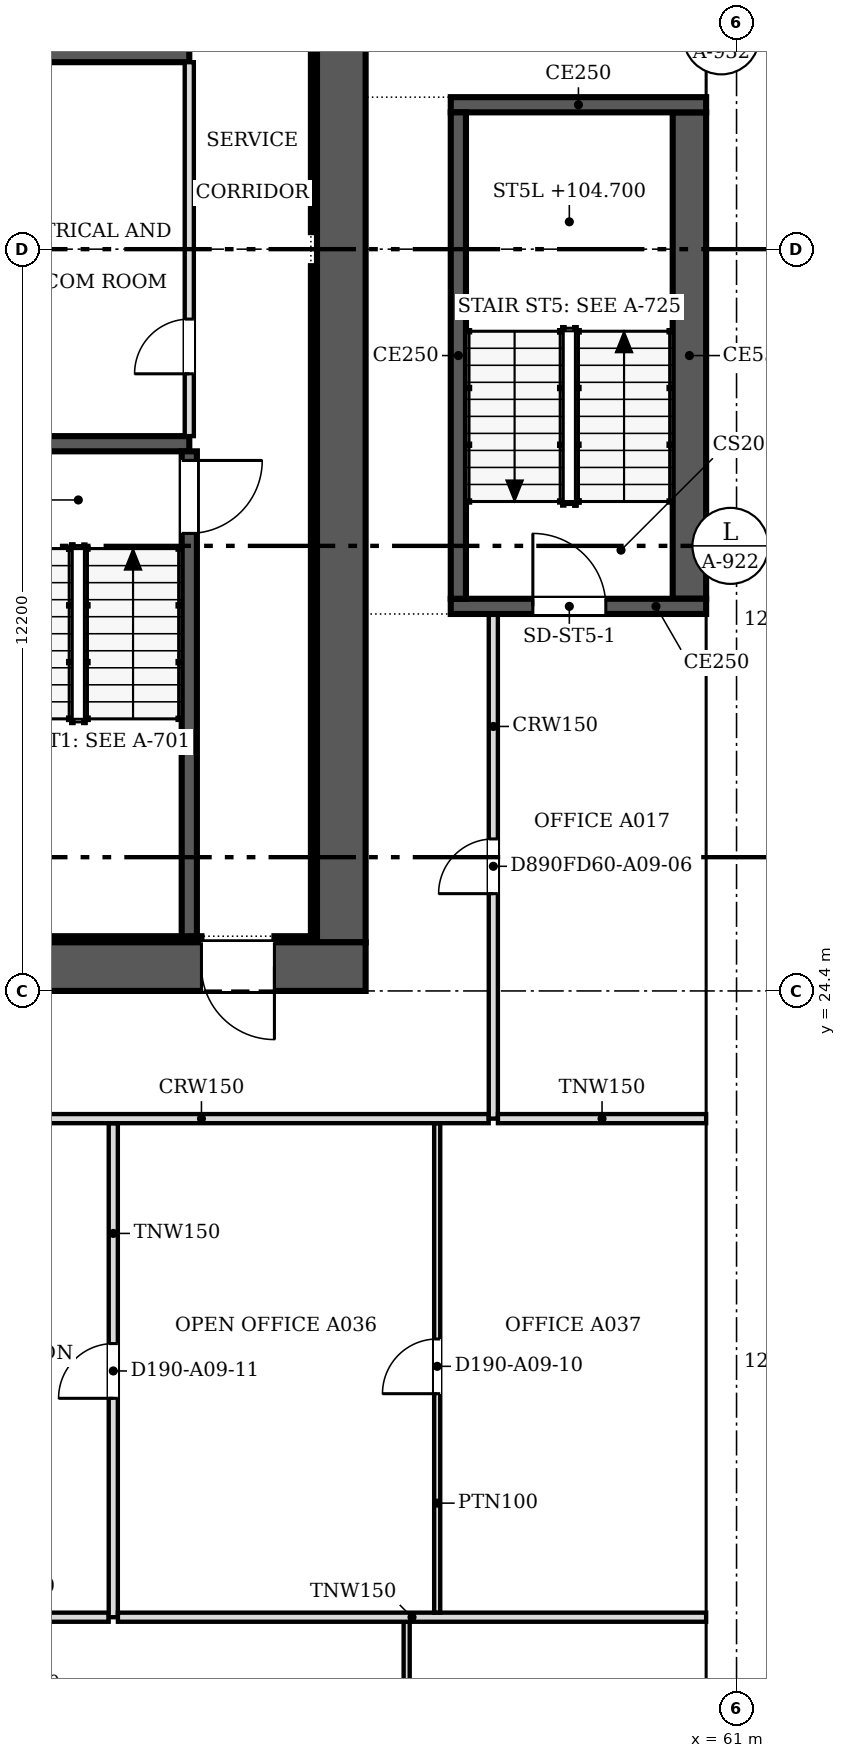
"""IFC4 building model, lengths in metres.
Left out: names, types, materials, properties, quantities, classifications, styles, units other than length and angle.
Written with IfcOpenShell. Run it as: python <this file> out.ifc"""

import sys

from ifc_helpers import new_model, si_unit, direction, frame, frame_2d, origin, place, context, subcontext, project, spatial, polyline, rectangle, outline, extrude, faceted_brep, source, transform, mapped, element, fill, save


model = new_model("IFC4")
c1 = context("Model", 3, precision=1e-05, world=origin(), true_north=direction((0.0, 1.0)))
c2 = subcontext(c1, "Body", "Model", "MODEL_VIEW")
j1 = project(units=[si_unit("LENGTHUNIT", "METRE"), si_unit("PLANEANGLEUNIT", "RADIAN")], contexts=[c1])
p1 = place(None, origin())
s1 = spatial("IfcSite", under=j1, at=p1, CompositionType="ELEMENT")
p2 = place(p1, origin())
s2 = spatial("IfcBuilding", under=s1, at=p2, CompositionType="ELEMENT")
p3 = place(p2, frame((0.0, 0.0, 102.8)))
s3 = spatial("IfcBuildingStorey", under=s2, at=p3, CompositionType="ELEMENT", Elevation=102.8)
m1 = source(origin(), c2, "Body", "SweptSolid", [
    extrude(outline(polyline([(3.05, 0.0), (6.1, 3.8), (3.05, 7.6), (0.0, 3.8), (3.05, 0.0)])), frame((0.0, 0.25, 0.0), z_axis=(0.0, -1.0, 0.0), x_axis=(1.0, 0.0, 0.0)), (0.0, 0.0, 1.0), 0.5),
])
p4 = place(p3, frame((60.75, 9.15, -3.8), z_axis=(0.0, 0.0, 1.0), x_axis=(0.0, 1.0, 0.0)))
e1 = element("IfcWall", 1, at=p4, inside=s3, PredefinedType="SOLIDWALL", context=c2, shape_type="MappedRepresentation", body=[
    mapped(m1, transform((0.0, 0.0, 0.0), scale=1.0)),
])
m2 = source(origin(), c2, "Body", "SweptSolid", [
    extrude(outline(polyline([(3.05, 0.399), (5.78, 3.8), (3.05, 7.201), (0.321, 3.8), (3.05, 0.399)])), frame((0.0, 0.26, 0.0), z_axis=(0.0, -1.0, 0.0), x_axis=(1.0, 0.0, 0.0)), (0.0, 0.0, 1.0), 0.52),
])
p5 = place(p4, origin())
e2 = element("IfcOpeningElement", 2, at=p5, cuts=e1, PredefinedType="OPENING", context=c2, shape_type="MappedRepresentation", body=[
    mapped(m2, transform((0.0, 0.0, 0.0), scale=1.0)),
])
p6 = place(p3, frame((60.75, 15.25, -3.8), z_axis=(0.0, 0.0, 1.0), x_axis=(0.0, 1.0, 0.0)))
e3 = element("IfcWall", 3, at=p6, inside=s3, PredefinedType="SOLIDWALL", context=c2, shape_type="MappedRepresentation", body=[
    mapped(m1, transform((0.0, 0.0, 0.0), scale=1.0)),
])
p7 = place(p6, origin())
e4 = element("IfcOpeningElement", 4, at=p7, cuts=e3, PredefinedType="OPENING", context=c2, shape_type="MappedRepresentation", body=[
    mapped(m2, transform((0.0, 0.0, 0.0), scale=1.0)),
])
m3 = source(origin(), c2, "Body", "Brep", [
    faceted_brep([(3.05, -0.25, 0.0), (6.1, -0.25, 3.8), (6.1, -0.25, 3.8), (3.05, -0.25, 7.6), (0.0, -0.25, 3.8), (0.0, 0.25, 3.8), (3.05, 0.25, 7.6), (6.1, 0.25, 3.8), (6.1, 0.25, 3.8), (3.05, 0.25, 0.0)], [[[0, 1, 2, 3, 4]], [[5, 6, 7, 8, 9]], [[9, 8, 1, 0]], [[7, 6, 3, 2]], [[6, 5, 4, 3]], [[5, 9, 0, 4]], [[1, 8, 7, 2]]]),
])
p8 = place(p3, frame((60.75, 21.35, -3.8), z_axis=(0.0, 0.0, 1.0), x_axis=(0.0, 1.0, 0.0)))
e5 = element("IfcWall", 5, at=p8, inside=s3, PredefinedType="SOLIDWALL", context=c2, shape_type="MappedRepresentation", body=[
    mapped(m3, transform((0.0, 0.0, 0.0), scale=1.0)),
])
p9 = place(p8, origin())
e6 = element("IfcOpeningElement", 6, at=p9, cuts=e5, PredefinedType="OPENING", context=c2, shape_type="MappedRepresentation", body=[
    mapped(m2, transform((0.0, 0.0, 0.0), scale=1.0)),
])
p10 = place(p3, frame((60.75, 27.45, -3.8), z_axis=(0.0, 0.0, 1.0), x_axis=(0.0, 1.0, 0.0)))
e7 = element("IfcWall", 7, at=p10, inside=s3, PredefinedType="SOLIDWALL", context=c2, shape_type="MappedRepresentation", body=[
    mapped(m1, transform((0.0, 0.0, 0.0), scale=1.0)),
])
p11 = place(p10, origin())
e8 = element("IfcOpeningElement", 8, at=p11, cuts=e7, PredefinedType="OPENING", context=c2, shape_type="MappedRepresentation", body=[
    mapped(m2, transform((0.0, 0.0, 0.0), scale=1.0)),
])
p12 = place(p3, frame((60.75, 33.55, -3.8), z_axis=(0.0, 0.0, 1.0), x_axis=(0.0, 1.0, 0.0)))
e9 = element("IfcWall", 9, at=p12, inside=s3, PredefinedType="SOLIDWALL", context=c2, shape_type="MappedRepresentation", body=[
    mapped(m3, transform((0.0, 0.0, 0.0), scale=1.0)),
])
p13 = place(p12, origin())
e10 = element("IfcOpeningElement", 10, at=p13, cuts=e9, PredefinedType="OPENING", context=c2, shape_type="MappedRepresentation", body=[
    mapped(m2, transform((0.0, 0.0, 0.0), scale=1.0)),
])
p14 = place(p3, frame((60.75, 39.65, -3.8), z_axis=(0.0, 0.0, 1.0), x_axis=(0.0, 1.0, 0.0)))
e11 = element("IfcWall", 11, at=p14, inside=s3, PredefinedType="SOLIDWALL", context=c2, shape_type="MappedRepresentation", body=[
    mapped(m1, transform((0.0, 0.0, 0.0), scale=1.0)),
])
p15 = place(p14, origin())
e12 = element("IfcOpeningElement", 12, at=p15, cuts=e11, PredefinedType="OPENING", context=c2, shape_type="MappedRepresentation", body=[
    mapped(m2, transform((0.0, 0.0, 0.0), scale=1.0)),
])
m4 = source(origin(), c2, "Body", "SweptSolid", [
    extrude(outline(polyline([(3.05, 0.0), (6.1, 3.8), (0.0, 3.8), (3.05, 0.0)])), frame((0.0, 0.25, 0.0), z_axis=(0.0, -1.0, 0.0), x_axis=(1.0, 0.0, 0.0)), (0.0, 0.0, 1.0), 0.5),
])
p16 = place(p3, frame((60.75, 12.2, 0.0), z_axis=(0.0, 0.0, 1.0), x_axis=(0.0, 1.0, 0.0)))
e13 = element("IfcWall", 13, at=p16, inside=s3, PredefinedType="SOLIDWALL", context=c2, shape_type="MappedRepresentation", body=[
    mapped(m4, transform((0.0, 0.0, 0.0), scale=1.0)),
])
m5 = source(origin(), c2, "Body", "SweptSolid", [
    extrude(outline(polyline([(3.05, 0.399), (5.579, 3.55), (0.521, 3.55), (3.05, 0.399)])), frame((0.0, 0.26, 0.0), z_axis=(0.0, -1.0, 0.0), x_axis=(1.0, 0.0, 0.0)), (0.0, 0.0, 1.0), 0.52),
])
p17 = place(p16, origin())
e14 = element("IfcOpeningElement", 14, at=p17, cuts=e13, PredefinedType="OPENING", context=c2, shape_type="MappedRepresentation", body=[
    mapped(m5, transform((0.0, 0.0, 0.0), scale=1.0)),
])
m6 = source(origin(), c2, "Body", "Brep", [
    faceted_brep([(3.05, -0.25, 0.0), (6.1, -0.25, 3.8), (6.1, -0.25, 3.8), (0.0, -0.25, 3.8), (0.0, 0.25, 3.8), (6.1, 0.25, 3.8), (6.1, 0.25, 3.8), (3.05, 0.25, 0.0)], [[[0, 1, 2, 3]], [[4, 5, 6, 7]], [[7, 6, 1, 0]], [[5, 4, 3, 2]], [[4, 7, 0, 3]], [[1, 6, 5, 2]]]),
])
p18 = place(p3, frame((60.75, 18.3, 0.0), z_axis=(0.0, 0.0, 1.0), x_axis=(0.0, 1.0, 0.0)))
e15 = element("IfcWall", 15, at=p18, inside=s3, PredefinedType="SOLIDWALL", context=c2, shape_type="MappedRepresentation", body=[
    mapped(m6, transform((0.0, 0.0, 0.0), scale=1.0)),
])
p19 = place(p18, origin())
e16 = element("IfcOpeningElement", 16, at=p19, cuts=e15, PredefinedType="OPENING", context=c2, shape_type="MappedRepresentation", body=[
    mapped(m5, transform((0.0, 0.0, 0.0), scale=1.0)),
])
p20 = place(p3, frame((60.75, 24.4, 0.0), z_axis=(0.0, 0.0, 1.0), x_axis=(0.0, 1.0, 0.0)))
e17 = element("IfcWall", 17, at=p20, inside=s3, PredefinedType="SOLIDWALL", context=c2, shape_type="MappedRepresentation", body=[
    mapped(m4, transform((0.0, 0.0, 0.0), scale=1.0)),
])
p21 = place(p20, origin())
e18 = element("IfcOpeningElement", 18, at=p21, cuts=e17, PredefinedType="OPENING", context=c2, shape_type="MappedRepresentation", body=[
    mapped(m5, transform((0.0, 0.0, 0.0), scale=1.0)),
])
p22 = place(p3, frame((60.75, 30.5, 0.0), z_axis=(0.0, 0.0, 1.0), x_axis=(0.0, 1.0, 0.0)))
e19 = element("IfcWall", 19, at=p22, inside=s3, PredefinedType="SOLIDWALL", context=c2, shape_type="MappedRepresentation", body=[
    mapped(m4, transform((0.0, 0.0, 0.0), scale=1.0)),
])
p23 = place(p22, origin())
e20 = element("IfcOpeningElement", 20, at=p23, cuts=e19, PredefinedType="OPENING", context=c2, shape_type="MappedRepresentation", body=[
    mapped(m5, transform((0.0, 0.0, 0.0), scale=1.0)),
])
p24 = place(p3, frame((60.75, 36.6, 0.0), z_axis=(0.0, 0.0, 1.0), x_axis=(0.0, 1.0, 0.0)))
e21 = element("IfcWall", 21, at=p24, inside=s3, PredefinedType="SOLIDWALL", context=c2, shape_type="MappedRepresentation", body=[
    mapped(m6, transform((0.0, 0.0, 0.0), scale=1.0)),
])
p25 = place(p24, origin())
e22 = element("IfcOpeningElement", 22, at=p25, cuts=e21, PredefinedType="OPENING", context=c2, shape_type="MappedRepresentation", body=[
    mapped(m5, transform((0.0, 0.0, 0.0), scale=1.0)),
])
p26 = place(p3, frame((54.9, 24.8, 0.0), z_axis=(0.0, 0.0, 1.0), x_axis=(-1.0, 0.0, 0.0)))
e23 = element("IfcWall", 23, at=p26, inside=s3, PredefinedType="SHEAR", context=c2, shape_type="SweptSolid", body=[
    extrude(rectangle(XDim=24.4, YDim=0.8, at=frame_2d((12.2, 0.0))), origin(), (0.0, 0.0, 1.0), 3.8),
])
m7 = source(origin(), c2, "Body", "SweptSolid", [
    extrude(rectangle(XDim=1.2, YDim=2.1, at=frame_2d((0.6, 1.05))), frame((0.0, 0.41, 0.0), z_axis=(0.0, -1.0, 0.0), x_axis=(1.0, 0.0, 0.0)), (0.0, 0.0, 1.0), 0.82),
])
p27 = place(p26, frame((1.5, 0.0, 0.0)))
e24 = element("IfcOpeningElement", 24, at=p27, cuts=e23, PredefinedType="OPENING", context=c2, shape_type="MappedRepresentation", body=[
    mapped(m7, transform((0.0, 0.0, 0.0), scale=1.0)),
])
p28 = place(p3, frame((54.5, 48.0, 0.0), z_axis=(0.0, 0.0, 1.0), x_axis=(0.0, -1.0, 0.0)))
e25 = element("IfcWall", 25, at=p28, inside=s3, PredefinedType="SHEAR", context=c2, shape_type="SweptSolid", body=[
    extrude(rectangle(XDim=22.8, YDim=0.8, at=frame_2d((11.4, 0.0))), origin(), (0.0, 0.0, 1.0), 3.8),
])
p29 = place(p28, frame((4.7, 0.0, 0.0)))
e26 = element("IfcOpeningElement", 26, at=p29, cuts=e25, PredefinedType="OPENING", context=c2, shape_type="MappedRepresentation", body=[
    mapped(m7, transform((0.0, 0.0, 0.0), scale=1.0)),
])
p30 = place(p3, frame((31.3, 25.25, 0.0), z_axis=(0.0, 0.0, 1.0), x_axis=(1.0, 0.0, 0.0)))
e27 = element("IfcWall", 27, at=p30, inside=s3, PredefinedType="SOLIDWALL", context=c2, shape_type="SweptSolid", body=[
    extrude(rectangle(XDim=20.9, YDim=0.1, at=frame_2d((10.45, 0.0))), origin(), (0.0, 0.0, 1.0), 3.8),
])
p31 = place(p3, frame((53.4, 25.25, 0.0), z_axis=(0.0, 0.0, 1.0), x_axis=(1.0, 0.0, 0.0)))
e28 = element("IfcWall", 28, at=p31, inside=s3, PredefinedType="SOLIDWALL", context=c2, shape_type="SweptSolid", body=[
    extrude(rectangle(XDim=0.7, YDim=0.1, at=frame_2d((0.35, 0.0))), origin(), (0.0, 0.0, 1.0), 3.8),
])
p32 = place(p3, frame((54.05, 25.3, 0.0), z_axis=(0.0, 0.0, 1.0), x_axis=(0.0, 1.0, 0.0)))
e29 = element("IfcWall", 29, at=p32, inside=s3, PredefinedType="SOLIDWALL", context=c2, shape_type="SweptSolid", body=[
    extrude(rectangle(XDim=11.02, YDim=0.1, at=frame_2d((5.51, 0.0))), origin(), (0.0, 0.0, 1.0), 3.8),
])
p33 = place(p3, frame((54.05, 36.88, 0.0), z_axis=(0.0, 0.0, 1.0), x_axis=(0.0, 1.0, 0.0)))
e30 = element("IfcWall", 30, at=p33, inside=s3, PredefinedType="SOLIDWALL", context=c2, shape_type="SweptSolid", body=[
    extrude(rectangle(XDim=5.22, YDim=0.1, at=frame_2d((2.61, 0.0))), origin(), (0.0, 0.0, 1.0), 3.8),
])
for number, where, z_axis, x_axis in (
    (31, (48.475, 33.4, 0.0), (0.0, 0.0, 1.0), (1.0, 0.0, 0.0)),
    (32, (48.475, 39.8, 0.0), (0.0, 0.0, 1.0), (1.0, 0.0, 0.0)),
):
    element("IfcWall", number, at=place(p3, frame(where, z_axis=z_axis, x_axis=x_axis)), inside=s3, PredefinedType="SOLIDWALL", context=c2, shape_type="SweptSolid", body=[
        extrude(rectangle(XDim=3.525, YDim=0.25, at=frame_2d((1.762, 0.0))), origin(), (0.0, 0.0, 1.0), 3.8),
    ])
p34 = place(p3, frame((52.0, 25.3, 0.0), z_axis=(0.0, 0.0, 1.0), x_axis=(0.0, 1.0, 0.0)))
e33 = element("IfcWall", 33, at=p34, inside=s3, PredefinedType="SOLIDWALL", context=c2, shape_type="SweptSolid", body=[
    extrude(rectangle(XDim=7.975, YDim=0.25, at=frame_2d((3.987, 0.0))), origin(), (0.0, 0.0, 1.0), 3.8),
])
m8 = source(origin(), c2, "Body", "SweptSolid", [
    extrude(rectangle(XDim=1.2, YDim=2.1, at=frame_2d((0.6, 1.05))), frame((0.0, 0.135, 0.0), z_axis=(0.0, -1.0, 0.0), x_axis=(1.0, 0.0, 0.0)), (0.0, 0.0, 1.0), 0.27),
])
p35 = place(p34, frame((6.625, 0.0, 0.0)))
e34 = element("IfcOpeningElement", 34, at=p35, cuts=e33, PredefinedType="OPENING", context=c2, shape_type="MappedRepresentation", body=[
    mapped(m8, transform((0.0, 0.0, 0.0), scale=1.0)),
])
p36 = place(p3, frame((52.0, 33.525, 0.0), z_axis=(0.0, 0.0, 1.0), x_axis=(0.0, 1.0, 0.0)))
e35 = element("IfcWall", 35, at=p36, inside=s3, PredefinedType="PARTITIONING", context=c2, shape_type="SweptSolid", body=[
    extrude(rectangle(XDim=6.15, YDim=0.15, at=frame_2d((3.075, 0.0))), origin(), (0.0, 0.0, 1.0), 3.55),
])
m9 = source(origin(), c2, "Body", "SweptSolid", [
    extrude(rectangle(XDim=0.9, YDim=2.1, at=frame_2d((0.45, 1.05))), frame((0.0, 0.085, 0.0), z_axis=(0.0, -1.0, 0.0), x_axis=(1.0, 0.0, 0.0)), (0.0, 0.0, 1.0), 0.17),
])
p37 = place(p36, frame((1.025, 0.0, 0.0)))
e36 = element("IfcOpeningElement", 36, at=p37, cuts=e35, PredefinedType="OPENING", context=c2, shape_type="MappedRepresentation", body=[
    mapped(m9, transform((0.0, 0.0, 0.0), scale=1.0)),
])
p38 = place(p3, frame((60.5, 30.725, 0.0), z_axis=(0.0, 0.0, 1.0), x_axis=(-1.0, 0.0, 0.0)))
e37 = element("IfcWall", 37, at=p38, inside=s3, PredefinedType="SOLIDWALL", context=c2, shape_type="SweptSolid", body=[
    extrude(rectangle(XDim=4.2, YDim=0.25, at=frame_2d((2.1, 0.0))), origin(), (0.0, 0.0, 1.0), 3.8),
])
p39 = place(p38, frame((1.65, 0.0, 0.0)))
e38 = element("IfcOpeningElement", 38, at=p39, cuts=e37, PredefinedType="OPENING", context=c2, shape_type="MappedRepresentation", body=[
    mapped(m8, transform((0.0, 0.0, 0.0), scale=1.0)),
])
p40 = place(p3, frame((56.425, 30.85, 0.0), z_axis=(0.0, 0.0, 1.0), x_axis=(0.0, 1.0, 0.0)))
e39 = element("IfcWall", 39, at=p40, inside=s3, PredefinedType="SOLIDWALL", context=c2, shape_type="SweptSolid", body=[
    extrude(rectangle(XDim=8.0, YDim=0.25, at=frame_2d((4.0, 0.0))), origin(), (0.0, 0.0, 1.0), 3.8),
])
p41 = place(p3, frame((56.3, 38.975, 0.0), z_axis=(0.0, 0.0, 1.0), x_axis=(1.0, 0.0, 0.0)))
e40 = element("IfcWall", 40, at=p41, inside=s3, PredefinedType="SOLIDWALL", context=c2, shape_type="SweptSolid", body=[
    extrude(rectangle(XDim=4.2, YDim=0.25, at=frame_2d((2.1, 0.0))), origin(), (0.0, 0.0, 1.0), 3.8),
])
p42 = place(p3, frame((60.225, 38.85, 0.0), z_axis=(0.0, 0.0, 1.0), x_axis=(0.0, -1.0, 0.0)))
e41 = element("IfcWall", 41, at=p42, inside=s3, PredefinedType="SOLIDWALL", context=c2, shape_type="SweptSolid", body=[
    extrude(rectangle(XDim=8.0, YDim=0.55, at=frame_2d((4.0, 0.0))), origin(), (0.0, 0.0, 1.0), 3.8),
])
p43 = place(p3, frame((55.575, 14.024, 0.0), z_axis=(0.0, 0.0, 1.0), x_axis=(0.0, -1.0, 0.0)))
e42 = element("IfcWall", 42, at=p43, inside=s3, PredefinedType="PARTITIONING", context=c2, shape_type="SweptSolid", body=[
    extrude(rectangle(XDim=5.924, YDim=0.1, at=frame_2d((2.962, 0.0))), origin(), (0.0, 0.0, 1.0), 2.715),
])
m10 = source(origin(), c2, "Body", "SweptSolid", [
    extrude(rectangle(XDim=0.9, YDim=2.1, at=frame_2d((0.45, 1.05))), frame((0.0, 0.06, 0.0), z_axis=(0.0, -1.0, 0.0), x_axis=(1.0, 0.0, 0.0)), (0.0, 0.0, 1.0), 0.12),
])
p44 = place(p43, frame((2.524, 0.0, 0.0)))
e43 = element("IfcOpeningElement", 43, at=p44, cuts=e42, PredefinedType="OPENING", context=c2, shape_type="MappedRepresentation", body=[
    mapped(m10, transform((0.0, 0.0, 0.0), scale=1.0)),
])
p45 = place(p3, frame((47.476, 14.1, 0.0), z_axis=(0.0, 0.0, 1.0), x_axis=(1.0, 0.0, 0.0)))
e44 = element("IfcWall", 44, at=p45, inside=s3, PredefinedType="PARTITIONING", context=c2, shape_type="SweptSolid", body=[
    extrude(rectangle(XDim=3.198, YDim=0.15, at=frame_2d((1.599, 0.0))), origin(), (0.0, 0.0, 1.0), 2.715),
])
p46 = place(p3, frame((50.75, 22.224, 0.0), z_axis=(0.0, 0.0, 1.0), x_axis=(0.0, -1.0, 0.0)))
e45 = element("IfcWall", 45, at=p46, inside=s3, PredefinedType="PARTITIONING", context=c2, shape_type="SweptSolid", body=[
    extrude(rectangle(XDim=8.124, YDim=0.15, at=frame_2d((4.062, 0.0))), origin(), (0.0, 0.0, 1.0), 2.715),
])
p47 = place(p46, frame((3.624, 0.0, 0.0)))
e46 = element("IfcOpeningElement", 46, at=p47, cuts=e45, PredefinedType="OPENING", context=c2, shape_type="MappedRepresentation", body=[
    mapped(m9, transform((0.0, 0.0, 0.0), scale=1.0)),
])
p48 = place(p3, frame((50.826, 14.1, 0.0), z_axis=(0.0, 0.0, 1.0), x_axis=(1.0, 0.0, 0.0)))
e47 = element("IfcWall", 47, at=p48, inside=s3, PredefinedType="PARTITIONING", context=c2, shape_type="SweptSolid", body=[
    extrude(rectangle(XDim=9.674, YDim=0.15, at=frame_2d((4.837, 0.0))), origin(), (0.0, 0.0, 1.0), 2.715),
])
p49 = place(p3, frame((56.077, 22.224, 0.0), z_axis=(0.0, 0.0, 1.0), x_axis=(0.0, -1.0, 0.0)))
e48 = element("IfcWall", 48, at=p49, inside=s3, PredefinedType="PARTITIONING", context=c2, shape_type="SweptSolid", body=[
    extrude(rectangle(XDim=8.048, YDim=0.1, at=frame_2d((4.024, 0.0))), origin(), (0.0, 0.0, 1.0), 2.715),
])
p50 = place(p49, frame((3.548, 0.0, 0.0)))
e49 = element("IfcOpeningElement", 49, at=p50, cuts=e48, PredefinedType="OPENING", context=c2, shape_type="MappedRepresentation", body=[
    mapped(m10, transform((0.0, 0.0, 0.0), scale=1.0)),
])
p51 = place(p3, frame((47.476, 22.3, 0.0), z_axis=(0.0, 0.0, 1.0), x_axis=(1.0, 0.0, 0.0)))
e50 = element("IfcWall", 50, at=p51, inside=s3, PredefinedType="PARTITIONING", context=c2, shape_type="SweptSolid", body=[
    extrude(rectangle(XDim=9.448, YDim=0.15, at=frame_2d((4.724, 0.0))), origin(), (0.0, 0.0, 1.0), 2.715),
])
p52 = place(p3, frame((57.0, 30.6, 0.0), z_axis=(0.0, 0.0, 1.0), x_axis=(0.0, -1.0, 0.0)))
e51 = element("IfcWall", 51, at=p52, inside=s3, PredefinedType="PARTITIONING", context=c2, shape_type="SweptSolid", body=[
    extrude(rectangle(XDim=8.3, YDim=0.15, at=frame_2d((4.15, 0.0))), origin(), (0.0, 0.0, 1.0), 2.715),
])
p53 = place(p52, frame((3.7, 0.0, 0.0)))
e52 = element("IfcOpeningElement", 52, at=p53, cuts=e51, PredefinedType="OPENING", context=c2, shape_type="MappedRepresentation", body=[
    mapped(m9, transform((0.0, 0.0, 0.0), scale=1.0)),
])
p54 = place(p3, frame((57.076, 22.3, 0.0), z_axis=(0.0, 0.0, 1.0), x_axis=(1.0, 0.0, 0.0)))
e53 = element("IfcWall", 53, at=p54, inside=s3, PredefinedType="PARTITIONING", context=c2, shape_type="SweptSolid", body=[
    extrude(rectangle(XDim=3.424, YDim=0.15, at=frame_2d((1.712, 0.0))), origin(), (0.0, 0.0, 1.0), 2.715),
])
m11 = source(origin(), c2, "Body", "SweptSolid", [
    extrude(rectangle(XDim=1.2, YDim=2.1, at=frame_2d((0.6, 1.05))), frame((0.0, 0.025, 0.0), z_axis=(0.0, -1.0, 0.0), x_axis=(1.0, 0.0, 0.0)), (0.0, 0.0, 1.0), 0.05),
])
p55 = place(p27, origin())
e54 = element("IfcDoor", 54, at=p55, inside=s3, OperationType="SINGLE_SWING_LEFT", PredefinedType="DOOR", context=c2, shape_type="MappedRepresentation", body=[
    mapped(m11, transform((0.0, 0.0, 0.0), scale=1.0)),
])
fill(e24, e54)
p56 = place(p35, origin())
e55 = element("IfcDoor", 55, at=p56, inside=s3, OperationType="SINGLE_SWING_RIGHT", PredefinedType="DOOR", context=c2, shape_type="MappedRepresentation", body=[
    mapped(m11, transform((0.0, 0.0, 0.0), scale=1.0)),
])
fill(e34, e55)
m12 = source(origin(), c2, "Body", "SweptSolid", [
    extrude(rectangle(XDim=0.9, YDim=2.1, at=frame_2d((0.45, 1.05))), frame((0.0, 0.025, 0.0), z_axis=(0.0, -1.0, 0.0), x_axis=(1.0, 0.0, 0.0)), (0.0, 0.0, 1.0), 0.05),
])
p57 = place(p37, origin())
e56 = element("IfcDoor", 56, at=p57, inside=s3, OperationType="SINGLE_SWING_LEFT", PredefinedType="DOOR", context=c2, shape_type="MappedRepresentation", body=[
    mapped(m12, transform((0.0, 0.0, 0.0), scale=1.0)),
])
fill(e36, e56)
p58 = place(p39, origin())
e57 = element("IfcDoor", 57, at=p58, inside=s3, OperationType="SINGLE_SWING_RIGHT", PredefinedType="DOOR", context=c2, shape_type="MappedRepresentation", body=[
    mapped(m11, transform((0.0, 0.0, 0.0), scale=1.0)),
])
fill(e38, e57)
p59 = place(p50, origin())
e58 = element("IfcDoor", 58, at=p59, inside=s3, OperationType="SINGLE_SWING_RIGHT", PredefinedType="DOOR", context=c2, shape_type="MappedRepresentation", body=[
    mapped(m12, transform((0.0, 0.0, 0.0), scale=1.0)),
])
fill(e49, e58)
p60 = place(p47, origin())
e59 = element("IfcDoor", 59, at=p60, inside=s3, OperationType="SINGLE_SWING_RIGHT", PredefinedType="DOOR", context=c2, shape_type="MappedRepresentation", body=[
    mapped(m12, transform((0.0, 0.0, 0.0), scale=1.0)),
])
fill(e46, e59)
p61 = place(p53, origin())
e60 = element("IfcDoor", 60, at=p61, inside=s3, OperationType="SINGLE_SWING_RIGHT", PredefinedType="DOOR", context=c2, shape_type="MappedRepresentation", body=[
    mapped(m12, transform((0.0, 0.0, 0.0), scale=1.0)),
])
fill(e52, e60)
save(model, sys.argv[1])
